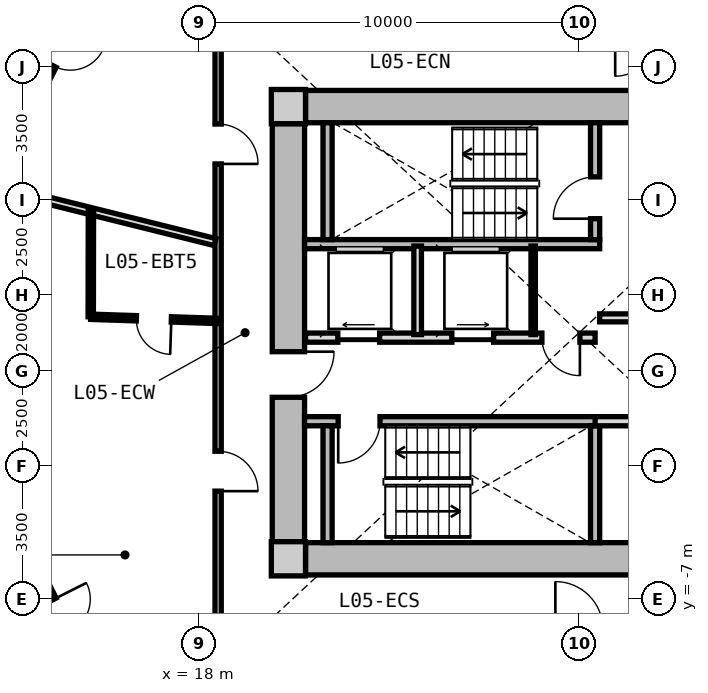
"""IFC4 building model, lengths in metres.
Left out: names, types, materials, properties, quantities, classifications, styles, units other than length and angle.
Written with IfcOpenShell. Run it as: python <this file> out.ifc"""

import sys

from ifc_helpers import new_model, si_unit, direction, frame, frame_2d, origin, origin_2d, place, context, subcontext, project, spatial, rectangle, extrude, source, transform, mapped, element, fill, save


model = new_model("IFC4")
c1 = context("Model", 3, precision=1e-05, world=origin(), true_north=direction((0.0, 1.0)))
c2 = subcontext(c1, "Body", "Model", "MODEL_VIEW")
j1 = project(units=[si_unit("LENGTHUNIT", "METRE"), si_unit("PLANEANGLEUNIT", "RADIAN")], contexts=[c1])
p1 = place(None, origin())
s1 = spatial("IfcSite", under=j1, at=p1, CompositionType="ELEMENT")
p2 = place(p1, origin())
s2 = spatial("IfcBuilding", under=s1, at=p2, CompositionType="ELEMENT")
p3 = place(p2, frame((0.0, 0.0, 21.6)))
s3 = spatial("IfcBuildingStorey", under=s2, at=p3, CompositionType="ELEMENT", Elevation=21.6)
m1 = source(origin(), c2, "Body", "SweptSolid", [
    extrude(rectangle(XDim=0.9, YDim=0.9, at=origin_2d()), origin(), (0.0, 0.0, 1.0), 3.05),
])
for number, where, z_axis, x_axis in (
    (1, (20.35, -5.95, 0.0), (0.0, 0.0, 1.0), (1.0, 0.0, 0.0)),
    (2, (20.35, 5.95, 0.0), (0.0, 0.0, 1.0), (1.0, 0.0, 0.0)),
):
    element("IfcColumn", number, at=place(p3, frame(where, z_axis=z_axis, x_axis=x_axis)), inside=s3, PredefinedType="COLUMN", context=c2, shape_type="MappedRepresentation", body=[
        mapped(m1, transform((0.0, 0.0, 0.0), x_axis=(1.0, 0.0, 0.0), y_axis=(0.0, 1.0, 0.0), z_axis=(0.0, 0.0, 1.0), scale=1.0)),
    ])
m2 = source(origin(), c2, "Body", "SweptSolid", [
    extrude(rectangle(XDim=14.4, YDim=0.85, at=frame_2d((7.2, 0.0))), origin(), (0.0, 0.0, 1.0), 2.79),
])
for number, where, z_axis, x_axis in (
    (3, (20.8, 5.95, 0.0), (0.0, 0.0, 1.0), (1.0, 0.0, 0.0)),
    (4, (35.2, -5.95, 0.0), (0.0, 0.0, 1.0), (-1.0, 0.0, 0.0)),
):
    element("IfcWall", number, at=place(p3, frame(where, z_axis=z_axis, x_axis=x_axis)), inside=s3, PredefinedType="SHEAR", context=c2, shape_type="MappedRepresentation", body=[
        mapped(m2, transform((0.0, 0.0, 0.0), x_axis=(1.0, 0.0, 0.0), y_axis=(0.0, 1.0, 0.0), z_axis=(0.0, 0.0, 1.0), scale=1.0)),
    ])
m3 = source(origin(), c2, "Body", "SweptSolid", [
    extrude(rectangle(XDim=11.0, YDim=0.85, at=frame_2d((5.5, 0.0))), origin(), (0.0, 0.0, 1.0), 2.79),
])
p4 = place(p3, frame((20.35, -5.5, 0.0), z_axis=(0.0, 0.0, 1.0), x_axis=(0.0, 1.0, 0.0)))
e5 = element("IfcWall", 5, at=p4, inside=s3, PredefinedType="SHEAR", context=c2, shape_type="MappedRepresentation", body=[
    mapped(m3, transform((0.0, 0.0, 0.0), x_axis=(1.0, 0.0, 0.0), y_axis=(0.0, 1.0, 0.0), z_axis=(0.0, 0.0, 1.0), scale=1.0)),
])
p5 = place(p4, frame((3.8, 0.0, 0.0)))
e6 = element("IfcOpeningElement", 6, at=p5, cuts=e5, PredefinedType="OPENING", context=c2, shape_type="SweptSolid", body=[
    extrude(rectangle(XDim=1.2, YDim=2.15, at=frame_2d((0.6, 1.075))), frame((0.0, 0.435, 0.0), z_axis=(0.0, -1.0, 0.0), x_axis=(1.0, 0.0, 0.0)), (0.0, 0.0, 1.0), 0.87),
])
m4 = source(origin(), c2, "Body", "SweptSolid", [
    extrude(rectangle(XDim=7.765, YDim=0.24, at=frame_2d((3.883, 0.0))), origin(), (0.0, 0.0, 1.0), 2.79),
])
p6 = place(p3, frame((20.775, 2.33, 0.0), z_axis=(0.0, 0.0, 1.0), x_axis=(1.0, 0.0, 0.0)))
e7 = element("IfcWall", 7, at=p6, inside=s3, PredefinedType="PARTITIONING", context=c2, shape_type="MappedRepresentation", body=[
    mapped(m4, transform((0.0, 0.0, 0.0), x_axis=(1.0, 0.0, 0.0), y_axis=(0.0, 1.0, 0.0), z_axis=(0.0, 0.0, 1.0), scale=1.0)),
])
m5 = source(origin(), c2, "Body", "SweptSolid", [
    extrude(rectangle(XDim=3.075, YDim=0.24, at=frame_2d((1.538, 0.0))), origin(), (0.0, 0.0, 1.0), 2.79),
])
p7 = place(p3, frame((21.38, 2.45, 0.0), z_axis=(0.0, 0.0, 1.0), x_axis=(0.0, 1.0, 0.0)))
e8 = element("IfcWall", 8, at=p7, inside=s3, PredefinedType="PARTITIONING", context=c2, shape_type="MappedRepresentation", body=[
    mapped(m5, transform((0.0, 0.0, 0.0), x_axis=(1.0, 0.0, 0.0), y_axis=(0.0, 1.0, 0.0), z_axis=(0.0, 0.0, 1.0), scale=1.0)),
])
p8 = place(p3, frame((28.42, 2.45, 0.0), z_axis=(0.0, 0.0, 1.0), x_axis=(0.0, 1.0, 0.0)))
e9 = element("IfcWall", 9, at=p8, inside=s3, PredefinedType="PARTITIONING", context=c2, shape_type="MappedRepresentation", body=[
    mapped(m5, transform((0.0, 0.0, 0.0), x_axis=(1.0, 0.0, 0.0), y_axis=(0.0, 1.0, 0.0), z_axis=(0.0, 0.0, 1.0), scale=1.0)),
])
p9 = place(p8, frame((0.55, 0.0, 0.0)))
e10 = element("IfcOpeningElement", 10, at=p9, cuts=e9, PredefinedType="OPENING", context=c2, shape_type="SweptSolid", body=[
    extrude(rectangle(XDim=1.1, YDim=2.15, at=frame_2d((0.55, 1.075))), frame((0.0, 0.13, 0.0), z_axis=(0.0, -1.0, 0.0), x_axis=(1.0, 0.0, 0.0)), (0.0, 0.0, 1.0), 0.26),
])
p10 = place(p3, frame((20.775, -2.33, 0.0), z_axis=(0.0, 0.0, 1.0), x_axis=(1.0, 0.0, 0.0)))
e11 = element("IfcWall", 11, at=p10, inside=s3, PredefinedType="PARTITIONING", context=c2, shape_type="MappedRepresentation", body=[
    mapped(m4, transform((0.0, 0.0, 0.0), x_axis=(1.0, 0.0, 0.0), y_axis=(0.0, 1.0, 0.0), z_axis=(0.0, 0.0, 1.0), scale=1.0)),
])
p11 = place(p10, frame((0.885, 0.0, 0.0)))
e12 = element("IfcOpeningElement", 12, at=p11, cuts=e11, PredefinedType="OPENING", context=c2, shape_type="SweptSolid", body=[
    extrude(rectangle(XDim=1.1, YDim=2.15, at=frame_2d((0.55, 1.075))), frame((0.0, 0.13, 0.0), z_axis=(0.0, -1.0, 0.0), x_axis=(1.0, 0.0, 0.0)), (0.0, 0.0, 1.0), 0.26),
])
for number, where, z_axis, x_axis in (
    (13, (21.38, -5.525, 0.0), (0.0, 0.0, 1.0), (0.0, 1.0, 0.0)),
    (14, (28.42, -5.525, 0.0), (0.0, 0.0, 1.0), (0.0, 1.0, 0.0)),
):
    element("IfcWall", number, at=place(p3, frame(where, z_axis=z_axis, x_axis=x_axis)), inside=s3, PredefinedType="PARTITIONING", context=c2, shape_type="MappedRepresentation", body=[
        mapped(m5, transform((0.0, 0.0, 0.0), x_axis=(1.0, 0.0, 0.0), y_axis=(0.0, 1.0, 0.0), z_axis=(0.0, 0.0, 1.0), scale=1.0)),
    ])
m6 = source(origin(), c2, "Body", "SweptSolid", [
    extrude(rectangle(XDim=6.66, YDim=0.21, at=frame_2d((3.33, 0.0))), origin(), (0.0, 0.0, 1.0), 2.775),
])
p12 = place(p3, frame((28.54, 0.39, 0.0), z_axis=(0.0, 0.0, 1.0), x_axis=(1.0, 0.0, 0.0)))
e15 = element("IfcWall", 15, at=p12, inside=s3, PredefinedType="PARTITIONING", context=c2, shape_type="MappedRepresentation", body=[
    mapped(m6, transform((0.0, 0.0, 0.0), x_axis=(1.0, 0.0, 0.0), y_axis=(0.0, 1.0, 0.0), z_axis=(0.0, 0.0, 1.0), scale=1.0)),
])
p13 = place(p12, frame((1.0, 0.0, 0.0)))
e16 = element("IfcOpeningElement", 16, at=p13, cuts=e15, PredefinedType="OPENING", context=c2, shape_type="SweptSolid", body=[
    extrude(rectangle(XDim=1.2, YDim=2.15, at=frame_2d((0.6, 1.075))), frame((0.0, 0.115, 0.0), z_axis=(0.0, -1.0, 0.0), x_axis=(1.0, 0.0, 0.0)), (0.0, 0.0, 1.0), 0.23),
])
m7 = source(origin(), c2, "Body", "SweptSolid", [
    extrude(rectangle(XDim=7.62, YDim=0.24, at=frame_2d((3.81, 0.0))), origin(), (0.0, 0.0, 1.0), 2.775),
])
p14 = place(p3, frame((20.8, -0.13, 0.0), z_axis=(0.0, 0.0, 1.0), x_axis=(1.0, 0.0, 0.0)))
e17 = element("IfcWall", 17, at=p14, inside=s3, PredefinedType="PARTITIONING", context=c2, shape_type="MappedRepresentation", body=[
    mapped(m7, transform((0.0, 0.0, 0.0), x_axis=(1.0, 0.0, 0.0), y_axis=(0.0, 1.0, 0.0), z_axis=(0.0, 0.0, 1.0), scale=1.0)),
])
p15 = place(p14, frame((6.22, 0.0, 0.0)))
e18 = element("IfcOpeningElement", 18, at=p15, cuts=e17, PredefinedType="OPENING", context=c2, shape_type="SweptSolid", body=[
    extrude(rectangle(XDim=1.0, YDim=2.1, at=frame_2d((0.5, 1.05))), frame((0.0, 0.13, 0.0), z_axis=(0.0, -1.0, 0.0), x_axis=(1.0, 0.0, 0.0)), (0.0, 0.0, 1.0), 0.26),
])
p16 = place(p14, frame((0.85, 0.0, 0.0)))
e19 = element("IfcOpeningElement", 19, at=p16, cuts=e17, PredefinedType="OPENING", context=c2, shape_type="SweptSolid", body=[
    extrude(rectangle(XDim=1.1, YDim=2.2, at=frame_2d((0.55, 1.1))), frame((0.0, 0.13, 0.0), z_axis=(0.0, -1.0, 0.0), x_axis=(1.0, 0.0, 0.0)), (0.0, 0.0, 1.0), 0.26),
])
p17 = place(p14, frame((3.85, 0.0, 0.0)))
e20 = element("IfcOpeningElement", 20, at=p17, cuts=e17, PredefinedType="OPENING", context=c2, shape_type="SweptSolid", body=[
    extrude(rectangle(XDim=1.1, YDim=2.2, at=frame_2d((0.55, 1.1))), frame((0.0, 0.13, 0.0), z_axis=(0.0, -1.0, 0.0), x_axis=(1.0, 0.0, 0.0)), (0.0, 0.0, 1.0), 0.26),
])
m8 = source(origin(), c2, "Body", "SweptSolid", [
    extrude(rectangle(XDim=2.33, YDim=0.115, at=frame_2d((1.165, 0.0))), origin(), (0.0, 0.0, 1.0), 2.775),
])
p18 = place(p3, frame((26.79, -0.05, 0.0), z_axis=(0.0, 0.0, 1.0), x_axis=(0.0, 1.0, 0.0)))
e21 = element("IfcWall", 21, at=p18, inside=s3, PredefinedType="PARTITIONING", context=c2, shape_type="MappedRepresentation", body=[
    mapped(m8, transform((0.0, 0.0, 0.0), x_axis=(1.0, 0.0, 0.0), y_axis=(0.0, 1.0, 0.0), z_axis=(0.0, 0.0, 1.0), scale=1.0)),
])
m9 = source(origin(), c2, "Body", "SweptSolid", [
    extrude(rectangle(XDim=2.33, YDim=0.2, at=frame_2d((1.165, 0.0))), origin(), (0.0, 0.0, 1.0), 2.775),
])
p19 = place(p3, frame((23.75, -0.05, 0.0), z_axis=(0.0, 0.0, 1.0), x_axis=(0.0, 1.0, 0.0)))
e22 = element("IfcWall", 22, at=p19, inside=s3, PredefinedType="PARTITIONING", context=c2, shape_type="MappedRepresentation", body=[
    mapped(m9, transform((0.0, 0.0, 0.0), x_axis=(1.0, 0.0, 0.0), y_axis=(0.0, 1.0, 0.0), z_axis=(0.0, 0.0, 1.0), scale=1.0)),
])
m10 = source(origin(), c2, "Body", "SweptSolid", [
    extrude(rectangle(XDim=4.13, YDim=0.24, at=frame_2d((2.065, 0.0))), origin(), (0.0, 0.0, 1.0), 2.775),
])
p20 = place(p3, frame((28.42, -2.33, 0.0), z_axis=(0.0, 0.0, 1.0), x_axis=(1.0, 0.0, 0.0)))
e23 = element("IfcWall", 23, at=p20, inside=s3, PredefinedType="PARTITIONING", context=c2, shape_type="MappedRepresentation", body=[
    mapped(m10, transform((0.0, 0.0, 0.0), x_axis=(1.0, 0.0, 0.0), y_axis=(0.0, 1.0, 0.0), z_axis=(0.0, 0.0, 1.0), scale=1.0)),
])
m11 = source(origin(), c2, "Body", "SweptSolid", [
    extrude(rectangle(XDim=15.6, YDim=0.165, at=frame_2d((7.8, 0.0))), origin(), (0.0, 0.0, 1.0), 2.775),
])
p21 = place(p3, frame((18.5, -7.8, 0.0), z_axis=(0.0, 0.0, 1.0), x_axis=(0.0, 1.0, 0.0)))
e24 = element("IfcWall", 24, at=p21, inside=s3, PredefinedType="PARTITIONING", context=c2, shape_type="MappedRepresentation", body=[
    mapped(m11, transform((0.0, 0.0, 0.0), x_axis=(1.0, 0.0, 0.0), y_axis=(0.0, 1.0, 0.0), z_axis=(0.0, 0.0, 1.0), scale=1.0)),
])
p22 = place(p21, frame((12.241, 0.0, 0.0)))
e25 = element("IfcOpeningElement", 25, at=p22, cuts=e24, PredefinedType="OPENING", context=c2, shape_type="SweptSolid", body=[
    extrude(rectangle(XDim=1.05, YDim=2.15, at=frame_2d((0.525, 1.075))), frame((0.0, 0.093, 0.0), z_axis=(0.0, -1.0, 0.0), x_axis=(1.0, 0.0, 0.0)), (0.0, 0.0, 1.0), 0.185),
])
p23 = place(p21, frame((3.63, 0.0, 0.0)))
e26 = element("IfcOpeningElement", 26, at=p23, cuts=e24, PredefinedType="OPENING", context=c2, shape_type="SweptSolid", body=[
    extrude(rectangle(XDim=1.05, YDim=2.15, at=frame_2d((0.525, 1.075))), frame((0.0, 0.093, 0.0), z_axis=(0.0, -1.0, 0.0), x_axis=(1.0, 0.0, 0.0)), (0.0, 0.0, 1.0), 0.185),
])
m12 = source(origin(), c2, "Body", "SweptSolid", [
    extrude(rectangle(XDim=9.737, YDim=0.19, at=frame_2d((4.869, 0.0))), origin(), (0.0, 0.0, 1.0), 2.225),
])
p24 = place(p3, frame((18.42, 2.385, 0.0), z_axis=(0.0, 0.0, 1.0), x_axis=(-0.970392716238, 0.241532557375, 0.0)))
e27 = element("IfcWall", 27, at=p24, inside=s3, PredefinedType="PARTITIONING", context=c2, shape_type="MappedRepresentation", body=[
    mapped(m12, transform((0.0, 0.0, 0.0), x_axis=(1.0, 0.0, 0.0), y_axis=(0.0, 1.0, 0.0), z_axis=(0.0, 0.0, 1.0), scale=1.0)),
])
m13 = source(origin(), c2, "Body", "SweptSolid", [
    extrude(rectangle(XDim=8.018, YDim=0.115, at=frame_2d((4.009, 0.0))), origin(), (0.0, 0.0, 1.0), 2.775),
])
p25 = place(p3, frame((16.205, 11.014, 0.0), z_axis=(0.0, 0.0, 1.0), x_axis=(-0.450134355233, -0.89296084026, 0.0)))
e28 = element("IfcWall", 28, at=p25, inside=s3, PredefinedType="PARTITIONING", context=c2, shape_type="MappedRepresentation", body=[
    mapped(m13, transform((0.0, 0.0, 0.0), x_axis=(1.0, 0.0, 0.0), y_axis=(0.0, 1.0, 0.0), z_axis=(0.0, 0.0, 1.0), scale=1.0)),
])
p26 = place(p25, frame((3.534, 0.0, 0.0)))
e29 = element("IfcOpeningElement", 29, at=p26, cuts=e28, PredefinedType="OPENING", context=c2, shape_type="SweptSolid", body=[
    extrude(rectangle(XDim=0.95, YDim=2.1, at=frame_2d((0.475, 1.05))), frame((0.0, 0.067, 0.0), z_axis=(0.0, -1.0, 0.0), x_axis=(1.0, 0.0, 0.0)), (0.0, 0.0, 1.0), 0.135),
])
p27 = place(p3, frame((12.596, -3.854, 0.0), z_axis=(0.0, 0.0, 1.0), x_axis=(0.450134355233, -0.89296084026, 0.0)))
e30 = element("IfcWall", 30, at=p27, inside=s3, PredefinedType="PARTITIONING", context=c2, shape_type="MappedRepresentation", body=[
    mapped(m13, transform((0.0, 0.0, 0.0), x_axis=(1.0, 0.0, 0.0), y_axis=(0.0, 1.0, 0.0), z_axis=(0.0, 0.0, 1.0), scale=1.0)),
])
p28 = place(p27, frame((3.534, 0.0, 0.0)))
e31 = element("IfcOpeningElement", 31, at=p28, cuts=e30, PredefinedType="OPENING", context=c2, shape_type="SweptSolid", body=[
    extrude(rectangle(XDim=0.95, YDim=2.1, at=frame_2d((0.475, 1.05))), frame((0.0, 0.067, 0.0), z_axis=(0.0, -1.0, 0.0), x_axis=(1.0, 0.0, 0.0)), (0.0, 0.0, 1.0), 0.135),
])
m14 = source(origin(), c2, "Body", "SweptSolid", [
    extrude(rectangle(XDim=3.323, YDim=0.14, at=frame_2d((1.662, 0.0))), origin(), (0.0, 0.0, 1.0), 2.775),
])
p29 = place(p3, frame((18.47, 0.311, 0.0), z_axis=(0.0, 0.0, 1.0), x_axis=(-0.999467979553, 0.032615300817, 0.0)))
e32 = element("IfcWall", 32, at=p29, inside=s3, PredefinedType="PARTITIONING", context=c2, shape_type="MappedRepresentation", body=[
    mapped(m14, transform((0.0, 0.0, 0.0), x_axis=(1.0, 0.0, 0.0), y_axis=(0.0, 1.0, 0.0), z_axis=(0.0, 0.0, 1.0), scale=1.0)),
])
p30 = place(p29, frame((1.202, 0.0, 0.0)))
e33 = element("IfcOpeningElement", 33, at=p30, cuts=e32, PredefinedType="OPENING", context=c2, shape_type="SweptSolid", body=[
    extrude(rectangle(XDim=0.92, YDim=2.1, at=frame_2d((0.46, 1.05))), frame((0.0, 0.08, 0.0), z_axis=(0.0, -1.0, 0.0), x_axis=(1.0, 0.0, 0.0)), (0.0, 0.0, 1.0), 0.16),
])
m15 = source(origin(), c2, "Body", "SweptSolid", [
    extrude(rectangle(XDim=2.795, YDim=0.14, at=frame_2d((1.397, 0.0))), origin(), (0.0, 0.0, 1.0), 2.775),
])
p31 = place(p3, frame((15.148, 0.419, 0.0), z_axis=(0.0, 0.0, 1.0), x_axis=(0.001659531299, 0.999998622977, 0.0)))
e34 = element("IfcWall", 34, at=p31, inside=s3, PredefinedType="PARTITIONING", context=c2, shape_type="MappedRepresentation", body=[
    mapped(m15, transform((0.0, 0.0, 0.0), x_axis=(1.0, 0.0, 0.0), y_axis=(0.0, 1.0, 0.0), z_axis=(0.0, 0.0, 1.0), scale=1.0)),
])
m16 = source(origin(), c2, "Body", "SweptSolid", [
    extrude(rectangle(XDim=1.1, YDim=2.15, at=frame_2d((0.55, 1.075))), frame((0.0, 0.025, 0.0), z_axis=(0.0, -1.0, 0.0), x_axis=(1.0, 0.0, 0.0)), (0.0, 0.0, 1.0), 0.05),
])
p32 = place(p9, origin())
e35 = element("IfcDoor", 35, at=p32, inside=s3, OperationType="SINGLE_SWING_LEFT", PredefinedType="DOOR", context=c2, shape_type="MappedRepresentation", body=[
    mapped(m16, transform((0.0, 0.0, 0.0), x_axis=(1.0, 0.0, 0.0), y_axis=(0.0, 1.0, 0.0), z_axis=(0.0, 0.0, 1.0), scale=1.0)),
])
fill(e10, e35)
p33 = place(p11, frame((1.1, 0.0, 0.0), z_axis=(0.0, 0.0, 1.0), x_axis=(-1.0, 0.0, 0.0)))
e36 = element("IfcDoor", 36, at=p33, inside=s3, OperationType="SINGLE_SWING_RIGHT", PredefinedType="DOOR", context=c2, shape_type="MappedRepresentation", body=[
    mapped(m16, transform((0.0, 0.0, 0.0), x_axis=(1.0, 0.0, 0.0), y_axis=(0.0, 1.0, 0.0), z_axis=(0.0, 0.0, 1.0), scale=1.0)),
])
fill(e12, e36)
m17 = source(origin(), c2, "Body", "SweptSolid", [
    extrude(rectangle(XDim=1.2, YDim=2.15, at=frame_2d((0.6, 1.075))), frame((0.0, 0.025, 0.0), z_axis=(0.0, -1.0, 0.0), x_axis=(1.0, 0.0, 0.0)), (0.0, 0.0, 1.0), 0.05),
])
p34 = place(p5, frame((1.2, 0.0, 0.0), z_axis=(0.0, 0.0, 1.0), x_axis=(-1.0, 0.0, 0.0)))
e37 = element("IfcDoor", 37, at=p34, inside=s3, OperationType="SINGLE_SWING_LEFT", PredefinedType="DOOR", context=c2, shape_type="MappedRepresentation", body=[
    mapped(m17, transform((0.0, 0.0, 0.0), x_axis=(1.0, 0.0, 0.0), y_axis=(0.0, 1.0, 0.0), z_axis=(0.0, 0.0, 1.0), scale=1.0)),
])
fill(e6, e37)
m18 = source(origin(), c2, "Body", "SweptSolid", [
    extrude(rectangle(XDim=1.0, YDim=2.1, at=frame_2d((0.5, 1.05))), frame((0.0, 0.025, 0.0), z_axis=(0.0, -1.0, 0.0), x_axis=(1.0, 0.0, 0.0)), (0.0, 0.0, 1.0), 0.05),
])
p35 = place(p15, frame((1.0, 0.0, 0.0), z_axis=(0.0, 0.0, 1.0), x_axis=(-1.0, 0.0, 0.0)))
e38 = element("IfcDoor", 38, at=p35, inside=s3, OperationType="SINGLE_SWING_LEFT", PredefinedType="DOOR", context=c2, shape_type="MappedRepresentation", body=[
    mapped(m18, transform((0.0, 0.0, 0.0), x_axis=(1.0, 0.0, 0.0), y_axis=(0.0, 1.0, 0.0), z_axis=(0.0, 0.0, 1.0), scale=1.0)),
])
fill(e18, e38)
m19 = source(origin(), c2, "Body", "SweptSolid", [
    extrude(rectangle(XDim=1.1, YDim=2.2, at=frame_2d((0.55, 1.1))), frame((0.0, 0.025, 0.0), z_axis=(0.0, -1.0, 0.0), x_axis=(1.0, 0.0, 0.0)), (0.0, 0.0, 1.0), 0.05),
])
p36 = place(p16, origin())
e39 = element("IfcDoor", 39, at=p36, inside=s3, OperationType="SLIDING_TO_LEFT", PredefinedType="DOOR", context=c2, shape_type="MappedRepresentation", body=[
    mapped(m19, transform((0.0, 0.0, 0.0), x_axis=(1.0, 0.0, 0.0), y_axis=(0.0, 1.0, 0.0), z_axis=(0.0, 0.0, 1.0), scale=1.0)),
])
fill(e19, e39)
p37 = place(p17, origin())
e40 = element("IfcDoor", 40, at=p37, inside=s3, OperationType="SLIDING_TO_RIGHT", PredefinedType="DOOR", context=c2, shape_type="MappedRepresentation", body=[
    mapped(m19, transform((0.0, 0.0, 0.0), x_axis=(1.0, 0.0, 0.0), y_axis=(0.0, 1.0, 0.0), z_axis=(0.0, 0.0, 1.0), scale=1.0)),
])
fill(e20, e40)
m20 = source(origin(), c2, "Body", "SweptSolid", [
    extrude(rectangle(XDim=1.05, YDim=2.15, at=frame_2d((0.525, 1.075))), frame((0.0, 0.025, 0.0), z_axis=(0.0, -1.0, 0.0), x_axis=(1.0, 0.0, 0.0)), (0.0, 0.0, 1.0), 0.05),
])
p38 = place(p22, frame((1.05, 0.0, 0.0), z_axis=(0.0, 0.0, 1.0), x_axis=(-1.0, 0.0, 0.0)))
e41 = element("IfcDoor", 41, at=p38, inside=s3, OperationType="SINGLE_SWING_RIGHT", PredefinedType="DOOR", context=c2, shape_type="MappedRepresentation", body=[
    mapped(m20, transform((0.0, 0.0, 0.0), x_axis=(1.0, 0.0, 0.0), y_axis=(0.0, 1.0, 0.0), z_axis=(0.0, 0.0, 1.0), scale=1.0)),
])
fill(e25, e41)
m21 = source(origin(), c2, "Body", "SweptSolid", [
    extrude(rectangle(XDim=0.95, YDim=2.1, at=frame_2d((0.475, 1.05))), frame((0.0, 0.025, 0.0), z_axis=(0.0, -1.0, 0.0), x_axis=(1.0, 0.0, 0.0)), (0.0, 0.0, 1.0), 0.05),
])
p39 = place(p26, origin())
e42 = element("IfcDoor", 42, at=p39, inside=s3, OperationType="SINGLE_SWING_LEFT", PredefinedType="DOOR", context=c2, shape_type="MappedRepresentation", body=[
    mapped(m21, transform((0.0, 0.0, 0.0), x_axis=(1.0, 0.0, 0.0), y_axis=(0.0, 1.0, 0.0), z_axis=(0.0, 0.0, 1.0), scale=1.0)),
])
fill(e29, e42)
p40 = place(p23, frame((1.05, 0.0, 0.0), z_axis=(0.0, 0.0, 1.0), x_axis=(-1.0, 0.0, 0.0)))
e43 = element("IfcDoor", 43, at=p40, inside=s3, OperationType="SINGLE_SWING_RIGHT", PredefinedType="DOOR", context=c2, shape_type="MappedRepresentation", body=[
    mapped(m20, transform((0.0, 0.0, 0.0), x_axis=(1.0, 0.0, 0.0), y_axis=(0.0, 1.0, 0.0), z_axis=(0.0, 0.0, 1.0), scale=1.0)),
])
fill(e26, e43)
m22 = source(origin(), c2, "Body", "SweptSolid", [
    extrude(rectangle(XDim=0.92, YDim=2.1, at=frame_2d((0.46, 1.05))), frame((0.0, 0.025, 0.0), z_axis=(0.0, -1.0, 0.0), x_axis=(1.0, 0.0, 0.0)), (0.0, 0.0, 1.0), 0.05),
])
p41 = place(p30, origin())
e44 = element("IfcDoor", 44, at=p41, inside=s3, OperationType="SINGLE_SWING_LEFT", PredefinedType="DOOR", context=c2, shape_type="MappedRepresentation", body=[
    mapped(m22, transform((0.0, 0.0, 0.0), x_axis=(1.0, 0.0, 0.0), y_axis=(0.0, 1.0, 0.0), z_axis=(0.0, 0.0, 1.0), scale=1.0)),
])
fill(e33, e44)
p42 = place(p28, origin())
e45 = element("IfcDoor", 45, at=p42, inside=s3, OperationType="SINGLE_SWING_LEFT", PredefinedType="DOOR", context=c2, shape_type="MappedRepresentation", body=[
    mapped(m21, transform((0.0, 0.0, 0.0), x_axis=(1.0, 0.0, 0.0), y_axis=(0.0, 1.0, 0.0), z_axis=(0.0, 0.0, 1.0), scale=1.0)),
])
fill(e31, e45)
save(model, sys.argv[1])
